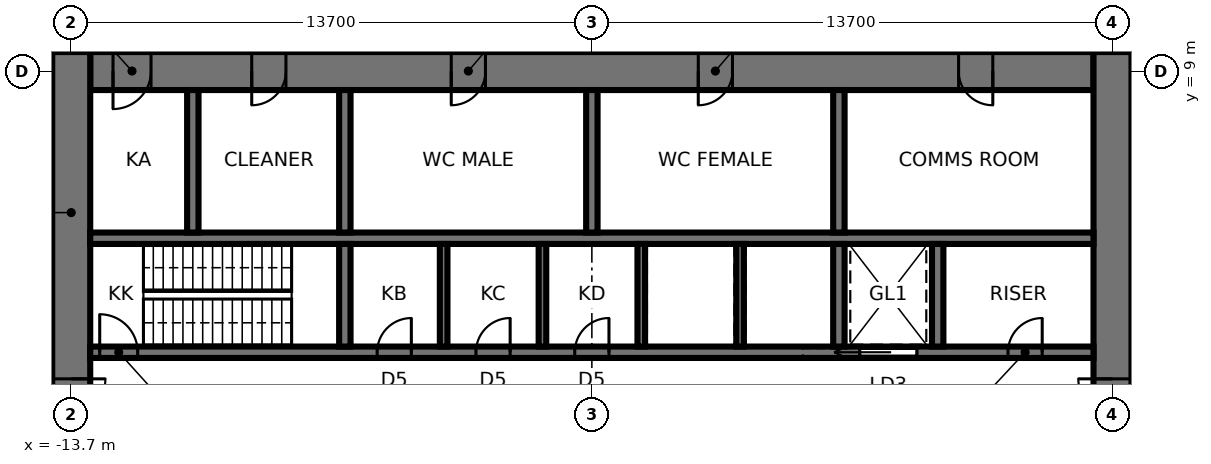
"""IFC4 building model, lengths in metres.
Left out: names, types, materials, properties, quantities, classifications, styles, units other than length and angle.
Written with IfcOpenShell. Run it as: python <this file> out.ifc"""

import sys

from ifc_helpers import new_model, si_unit, direction, frame, frame_2d, origin, place, context, subcontext, project, spatial, rectangle, extrude, element, fill, save


model = new_model("IFC4")
c1 = context("Model", 3, precision=1e-05, world=origin(), true_north=direction((0.0, 1.0)))
c2 = subcontext(c1, "Body", "Model", "MODEL_VIEW")
j1 = project(units=[si_unit("LENGTHUNIT", "METRE"), si_unit("PLANEANGLEUNIT", "RADIAN")], contexts=[c1])
p1 = place(None, origin())
s1 = spatial("IfcSite", under=j1, at=p1, CompositionType="ELEMENT")
p2 = place(p1, origin())
s2 = spatial("IfcBuilding", under=s1, at=p2, CompositionType="ELEMENT")
p3 = place(p2, frame((0.0, 0.0, 246.2)))
s3 = spatial("IfcBuildingStorey", under=s2, at=p3, CompositionType="ELEMENT", Elevation=246.2)
p4 = place(p3, frame((13.2, 9.0, 0.0), z_axis=(0.0, 0.0, 1.0), x_axis=(-1.0, 0.0, 0.0)))
e1 = element("IfcWall", 1, at=p4, inside=s3, PredefinedType="SHEAR", context=c2, shape_type="SweptSolid", body=[
    extrude(rectangle(XDim=26.4, YDim=1.0, at=frame_2d((13.2, 0.0))), origin(), (0.0, 0.0, 1.0), 5.6),
])
p5 = place(p4, frame((2.65, 0.0, 0.0)))
e2 = element("IfcOpeningElement", 2, at=p5, cuts=e1, PredefinedType="OPENING", context=c2, shape_type="SweptSolid", body=[
    extrude(rectangle(XDim=0.9, YDim=2.1, at=frame_2d((0.45, 1.05))), frame((0.0, 0.51, 0.0), z_axis=(0.0, -1.0, 0.0), x_axis=(1.0, 0.0, 0.0)), (0.0, 0.0, 1.0), 1.02),
])
p6 = place(p4, frame((9.5, 0.0, 0.0)))
e3 = element("IfcOpeningElement", 3, at=p6, cuts=e1, PredefinedType="OPENING", context=c2, shape_type="SweptSolid", body=[
    extrude(rectangle(XDim=0.9, YDim=2.1, at=frame_2d((0.45, 1.05))), frame((0.0, 0.51, 0.0), z_axis=(0.0, -1.0, 0.0), x_axis=(1.0, 0.0, 0.0)), (0.0, 0.0, 1.0), 1.02),
])
p7 = place(p4, frame((16.0, 0.0, 0.0)))
e4 = element("IfcOpeningElement", 4, at=p7, cuts=e1, PredefinedType="OPENING", context=c2, shape_type="SweptSolid", body=[
    extrude(rectangle(XDim=0.9, YDim=2.1, at=frame_2d((0.45, 1.05))), frame((0.0, 0.51, 0.0), z_axis=(0.0, -1.0, 0.0), x_axis=(1.0, 0.0, 0.0)), (0.0, 0.0, 1.0), 1.02),
])
p8 = place(p4, frame((21.25, 0.0, 0.0)))
e5 = element("IfcOpeningElement", 5, at=p8, cuts=e1, PredefinedType="OPENING", context=c2, shape_type="SweptSolid", body=[
    extrude(rectangle(XDim=0.9, YDim=2.1, at=frame_2d((0.45, 1.05))), frame((0.0, 0.51, 0.0), z_axis=(0.0, -1.0, 0.0), x_axis=(1.0, 0.0, 0.0)), (0.0, 0.0, 1.0), 1.02),
])
p9 = place(p4, frame((24.8, 0.0, 0.0)))
e6 = element("IfcOpeningElement", 6, at=p9, cuts=e1, PredefinedType="OPENING", context=c2, shape_type="SweptSolid", body=[
    extrude(rectangle(XDim=1.0, YDim=2.1, at=frame_2d((0.5, 1.05))), frame((0.0, 0.51, 0.0), z_axis=(0.0, -1.0, 0.0), x_axis=(1.0, 0.0, 0.0)), (0.0, 0.0, 1.0), 1.02),
])
p10 = place(p3, frame((13.7, -9.5, 0.0), z_axis=(0.0, 0.0, 1.0), x_axis=(0.0, 1.0, 0.0)))
e7 = element("IfcWall", 7, at=p10, inside=s3, PredefinedType="SHEAR", context=c2, shape_type="SweptSolid", body=[
    extrude(rectangle(XDim=19.0, YDim=1.0, at=frame_2d((9.5, 0.0))), origin(), (0.0, 0.0, 1.0), 5.6),
])
p11 = place(p10, frame((8.6, 0.0, 0.0)))
e8 = element("IfcOpeningElement", 8, at=p11, cuts=e7, PredefinedType="OPENING", context=c2, shape_type="SweptSolid", body=[
    extrude(rectangle(XDim=1.8, YDim=2.4, at=frame_2d((0.9, 1.2))), frame((0.0, 0.51, 0.0), z_axis=(0.0, -1.0, 0.0), x_axis=(1.0, 0.0, 0.0)), (0.0, 0.0, 1.0), 1.02),
])
p12 = place(p3, frame((-13.7, 9.5, 0.0), z_axis=(0.0, 0.0, 1.0), x_axis=(0.0, -1.0, 0.0)))
e9 = element("IfcWall", 9, at=p12, inside=s3, PredefinedType="SHEAR", context=c2, shape_type="SweptSolid", body=[
    extrude(rectangle(XDim=19.0, YDim=1.0, at=frame_2d((9.5, 0.0))), origin(), (0.0, 0.0, 1.0), 5.6),
])
p13 = place(p12, frame((8.6, 0.0, 0.0)))
e10 = element("IfcOpeningElement", 10, at=p13, cuts=e9, PredefinedType="OPENING", context=c2, shape_type="SweptSolid", body=[
    extrude(rectangle(XDim=1.8, YDim=2.4, at=frame_2d((0.9, 1.2))), frame((0.0, 0.51, 0.0), z_axis=(0.0, -1.0, 0.0), x_axis=(1.0, 0.0, 0.0)), (0.0, 0.0, 1.0), 1.02),
])
p14 = place(p3, frame((-13.2, 1.6, 0.0), z_axis=(0.0, 0.0, 1.0), x_axis=(1.0, 0.0, 0.0)))
e11 = element("IfcWall", 11, at=p14, inside=s3, PredefinedType="SHEAR", context=c2, shape_type="SweptSolid", body=[
    extrude(rectangle(XDim=26.4, YDim=0.3, at=frame_2d((13.2, 0.0))), origin(), (0.0, 0.0, 1.0), 5.6),
])
p15 = place(p14, frame((0.25, 0.0, 0.0)))
e12 = element("IfcOpeningElement", 12, at=p15, cuts=e11, PredefinedType="OPENING", context=c2, shape_type="SweptSolid", body=[
    extrude(rectangle(XDim=1.0, YDim=2.1, at=frame_2d((0.5, 1.05))), frame((0.0, 0.16, 0.0), z_axis=(0.0, -1.0, 0.0), x_axis=(1.0, 0.0, 0.0)), (0.0, 0.0, 1.0), 0.32),
])
p16 = place(p14, frame((20.25, 0.0, 0.0)))
e13 = element("IfcOpeningElement", 13, at=p16, cuts=e11, PredefinedType="OPENING", context=c2, shape_type="SweptSolid", body=[
    extrude(rectangle(XDim=1.5, YDim=2.4, at=frame_2d((0.75, 1.2))), frame((0.0, 0.16, 0.0), z_axis=(0.0, -1.0, 0.0), x_axis=(1.0, 0.0, 0.0)), (0.0, 0.0, 1.0), 0.32),
])
p17 = place(p14, frame((7.55, 0.0, 0.0)))
e14 = element("IfcOpeningElement", 14, at=p17, cuts=e11, PredefinedType="OPENING", context=c2, shape_type="SweptSolid", body=[
    extrude(rectangle(XDim=0.9, YDim=2.1, at=frame_2d((0.45, 1.05))), frame((0.0, 0.16, 0.0), z_axis=(0.0, -1.0, 0.0), x_axis=(1.0, 0.0, 0.0)), (0.0, 0.0, 1.0), 0.32),
])
p18 = place(p14, frame((10.15, 0.0, 0.0)))
e15 = element("IfcOpeningElement", 15, at=p18, cuts=e11, PredefinedType="OPENING", context=c2, shape_type="SweptSolid", body=[
    extrude(rectangle(XDim=0.9, YDim=2.1, at=frame_2d((0.45, 1.05))), frame((0.0, 0.16, 0.0), z_axis=(0.0, -1.0, 0.0), x_axis=(1.0, 0.0, 0.0)), (0.0, 0.0, 1.0), 0.32),
])
p19 = place(p14, frame((12.75, 0.0, 0.0)))
e16 = element("IfcOpeningElement", 16, at=p19, cuts=e11, PredefinedType="OPENING", context=c2, shape_type="SweptSolid", body=[
    extrude(rectangle(XDim=0.9, YDim=2.1, at=frame_2d((0.45, 1.05))), frame((0.0, 0.16, 0.0), z_axis=(0.0, -1.0, 0.0), x_axis=(1.0, 0.0, 0.0)), (0.0, 0.0, 1.0), 0.32),
])
p20 = place(p14, frame((24.15, 0.0, 0.0)))
e17 = element("IfcOpeningElement", 17, at=p20, cuts=e11, PredefinedType="OPENING", context=c2, shape_type="SweptSolid", body=[
    extrude(rectangle(XDim=0.9, YDim=2.1, at=frame_2d((0.45, 1.05))), frame((0.0, 0.16, 0.0), z_axis=(0.0, -1.0, 0.0), x_axis=(1.0, 0.0, 0.0)), (0.0, 0.0, 1.0), 0.32),
])
p21 = place(p3, frame((-13.2, 4.6, 0.0), z_axis=(0.0, 0.0, 1.0), x_axis=(1.0, 0.0, 0.0)))
e18 = element("IfcWall", 18, at=p21, inside=s3, PredefinedType="SHEAR", context=c2, shape_type="SweptSolid", body=[
    extrude(rectangle(XDim=26.4, YDim=0.3, at=frame_2d((13.2, 0.0))), origin(), (0.0, 0.0, 1.0), 5.6),
])
p22 = place(p3, frame((-6.5, 1.75, 0.0), z_axis=(0.0, 0.0, 1.0), x_axis=(0.0, 1.0, 0.0)))
e19 = element("IfcWall", 19, at=p22, inside=s3, PredefinedType="SHEAR", context=c2, shape_type="SweptSolid", body=[
    extrude(rectangle(XDim=2.7, YDim=0.3, at=frame_2d((1.35, 0.0))), origin(), (0.0, 0.0, 1.0), 5.6),
])
p23 = place(p3, frame((-6.5, 4.75, 0.0), z_axis=(0.0, 0.0, 1.0), x_axis=(0.0, 1.0, 0.0)))
e20 = element("IfcWall", 20, at=p23, inside=s3, PredefinedType="SHEAR", context=c2, shape_type="SweptSolid", body=[
    extrude(rectangle(XDim=3.75, YDim=0.3, at=frame_2d((1.875, 0.0))), origin(), (0.0, 0.0, 1.0), 5.6),
])
p24 = place(p3, frame((6.5, 1.75, 0.0), z_axis=(0.0, 0.0, 1.0), x_axis=(0.0, 1.0, 0.0)))
e21 = element("IfcWall", 21, at=p24, inside=s3, PredefinedType="SHEAR", context=c2, shape_type="SweptSolid", body=[
    extrude(rectangle(XDim=2.7, YDim=0.3, at=frame_2d((1.35, 0.0))), origin(), (0.0, 0.0, 1.0), 5.6),
])
p25 = place(p3, frame((6.5, 4.75, 0.0), z_axis=(0.0, 0.0, 1.0), x_axis=(0.0, 1.0, 0.0)))
e22 = element("IfcWall", 22, at=p25, inside=s3, PredefinedType="SHEAR", context=c2, shape_type="SweptSolid", body=[
    extrude(rectangle(XDim=3.75, YDim=0.3, at=frame_2d((1.875, 0.0))), origin(), (0.0, 0.0, 1.0), 5.6),
])
for number, where, z_axis, x_axis in (
    (23, (-3.9, 1.75, 0.0), (0.0, 0.0, 1.0), (0.0, 1.0, 0.0)),
    (24, (-1.3, 1.75, 0.0), (0.0, 0.0, 1.0), (0.0, 1.0, 0.0)),
    (25, (1.3, 1.75, 0.0), (0.0, 0.0, 1.0), (0.0, 1.0, 0.0)),
    (26, (3.9, 1.75, 0.0), (0.0, 0.0, 1.0), (0.0, 1.0, 0.0)),
):
    element("IfcWall", number, at=place(p3, frame(where, z_axis=z_axis, x_axis=x_axis)), inside=s3, PredefinedType="SHEAR", context=c2, shape_type="SweptSolid", body=[
        extrude(rectangle(XDim=2.7, YDim=0.2, at=frame_2d((1.35, 0.0))), origin(), (0.0, 0.0, 1.0), 5.6),
    ])
for number, where, z_axis, x_axis in (
    (27, (0.0, 4.75, 0.0), (0.0, 0.0, 1.0), (0.0, 1.0, 0.0)),
    (28, (-10.5, 4.75, 0.0), (0.0, 0.0, 1.0), (0.0, 1.0, 0.0)),
):
    element("IfcWall", number, at=place(p3, frame(where, z_axis=z_axis, x_axis=x_axis)), inside=s3, PredefinedType="SHEAR", context=c2, shape_type="SweptSolid", body=[
        extrude(rectangle(XDim=3.75, YDim=0.3, at=frame_2d((1.875, 0.0))), origin(), (0.0, 0.0, 1.0), 5.6),
    ])
p26 = place(p3, frame((9.1, 1.75, 0.0), z_axis=(0.0, 0.0, 1.0), x_axis=(0.0, 1.0, 0.0)))
e29 = element("IfcWall", 29, at=p26, inside=s3, PredefinedType="SHEAR", context=c2, shape_type="SweptSolid", body=[
    extrude(rectangle(XDim=2.7, YDim=0.3, at=frame_2d((1.35, 0.0))), origin(), (0.0, 0.0, 1.0), 5.6),
])
p27 = place(p13, origin())
e30 = element("IfcDoor", 30, at=p27, inside=s3, OperationType="DOUBLE_DOOR_SINGLE_SWING", PredefinedType="DOOR", context=c2, shape_type="SweptSolid", body=[
    extrude(rectangle(XDim=1.72, YDim=2.36, at=frame_2d((0.9, 1.18))), frame((0.0, 0.025, 0.0), z_axis=(0.0, -1.0, 0.0), x_axis=(1.0, 0.0, 0.0)), (0.0, 0.0, 1.0), 0.05),
    extrude(rectangle(XDim=0.04, YDim=2.4, at=frame_2d((0.02, 1.2))), frame((0.0, 0.25, 0.0), z_axis=(0.0, -1.0, 0.0), x_axis=(1.0, 0.0, 0.0)), (0.0, 0.0, 1.0), 0.5),
    extrude(rectangle(XDim=0.04, YDim=2.4, at=frame_2d((1.78, 1.2))), frame((0.0, 0.25, 0.0), z_axis=(0.0, -1.0, 0.0), x_axis=(1.0, 0.0, 0.0)), (0.0, 0.0, 1.0), 0.5),
    extrude(rectangle(XDim=1.72, YDim=0.04, at=frame_2d((0.9, 2.38))), frame((0.0, 0.25, 0.0), z_axis=(0.0, -1.0, 0.0), x_axis=(1.0, 0.0, 0.0)), (0.0, 0.0, 1.0), 0.5),
])
fill(e10, e30)
p28 = place(p11, origin())
e31 = element("IfcDoor", 31, at=p28, inside=s3, OperationType="DOUBLE_DOOR_SINGLE_SWING", PredefinedType="DOOR", context=c2, shape_type="SweptSolid", body=[
    extrude(rectangle(XDim=1.72, YDim=2.36, at=frame_2d((0.9, 1.18))), frame((0.0, 0.025, 0.0), z_axis=(0.0, -1.0, 0.0), x_axis=(1.0, 0.0, 0.0)), (0.0, 0.0, 1.0), 0.05),
    extrude(rectangle(XDim=0.04, YDim=2.4, at=frame_2d((0.02, 1.2))), frame((0.0, 0.25, 0.0), z_axis=(0.0, -1.0, 0.0), x_axis=(1.0, 0.0, 0.0)), (0.0, 0.0, 1.0), 0.5),
    extrude(rectangle(XDim=0.04, YDim=2.4, at=frame_2d((1.78, 1.2))), frame((0.0, 0.25, 0.0), z_axis=(0.0, -1.0, 0.0), x_axis=(1.0, 0.0, 0.0)), (0.0, 0.0, 1.0), 0.5),
    extrude(rectangle(XDim=1.72, YDim=0.04, at=frame_2d((0.9, 2.38))), frame((0.0, 0.25, 0.0), z_axis=(0.0, -1.0, 0.0), x_axis=(1.0, 0.0, 0.0)), (0.0, 0.0, 1.0), 0.5),
])
fill(e8, e31)
p29 = place(p15, origin())
e32 = element("IfcDoor", 32, at=p29, inside=s3, OperationType="SINGLE_SWING_LEFT", PredefinedType="DOOR", context=c2, shape_type="SweptSolid", body=[
    extrude(rectangle(XDim=1.0, YDim=2.1, at=frame_2d((0.5, 1.05))), frame((0.0, 0.025, 0.0), z_axis=(0.0, -1.0, 0.0), x_axis=(1.0, 0.0, 0.0)), (0.0, 0.0, 1.0), 0.05),
])
fill(e12, e32)
p30 = place(p16, origin())
e33 = element("IfcDoor", 33, at=p30, inside=s3, OperationType="SLIDING_TO_LEFT", PredefinedType="DOOR", context=c2, shape_type="SweptSolid", body=[
    extrude(rectangle(XDim=1.5, YDim=2.4, at=frame_2d((0.75, 1.2))), frame((0.0, 0.025, 0.0), z_axis=(0.0, -1.0, 0.0), x_axis=(1.0, 0.0, 0.0)), (0.0, 0.0, 1.0), 0.05),
])
fill(e13, e33)
p31 = place(p17, origin())
e34 = element("IfcDoor", 34, at=p31, inside=s3, OperationType="SINGLE_SWING_RIGHT", PredefinedType="DOOR", context=c2, shape_type="SweptSolid", body=[
    extrude(rectangle(XDim=0.9, YDim=2.1, at=frame_2d((0.45, 1.05))), frame((0.0, 0.025, 0.0), z_axis=(0.0, -1.0, 0.0), x_axis=(1.0, 0.0, 0.0)), (0.0, 0.0, 1.0), 0.05),
])
fill(e14, e34)
p32 = place(p18, origin())
e35 = element("IfcDoor", 35, at=p32, inside=s3, OperationType="SINGLE_SWING_RIGHT", PredefinedType="DOOR", context=c2, shape_type="SweptSolid", body=[
    extrude(rectangle(XDim=0.9, YDim=2.1, at=frame_2d((0.45, 1.05))), frame((0.0, 0.025, 0.0), z_axis=(0.0, -1.0, 0.0), x_axis=(1.0, 0.0, 0.0)), (0.0, 0.0, 1.0), 0.05),
])
fill(e15, e35)
p33 = place(p19, origin())
e36 = element("IfcDoor", 36, at=p33, inside=s3, OperationType="SINGLE_SWING_RIGHT", PredefinedType="DOOR", context=c2, shape_type="SweptSolid", body=[
    extrude(rectangle(XDim=0.9, YDim=2.1, at=frame_2d((0.45, 1.05))), frame((0.0, 0.025, 0.0), z_axis=(0.0, -1.0, 0.0), x_axis=(1.0, 0.0, 0.0)), (0.0, 0.0, 1.0), 0.05),
])
fill(e16, e36)
p34 = place(p20, origin())
e37 = element("IfcDoor", 37, at=p34, inside=s3, OperationType="SINGLE_SWING_RIGHT", PredefinedType="DOOR", context=c2, shape_type="SweptSolid", body=[
    extrude(rectangle(XDim=0.9, YDim=2.1, at=frame_2d((0.45, 1.05))), frame((0.0, 0.025, 0.0), z_axis=(0.0, -1.0, 0.0), x_axis=(1.0, 0.0, 0.0)), (0.0, 0.0, 1.0), 0.05),
])
fill(e17, e37)
p35 = place(p5, origin())
e38 = element("IfcDoor", 38, at=p35, inside=s3, OperationType="SINGLE_SWING_LEFT", PredefinedType="DOOR", context=c2, shape_type="SweptSolid", body=[
    extrude(rectangle(XDim=0.82, YDim=2.06, at=frame_2d((0.45, 1.03))), frame((0.0, 0.025, 0.0), z_axis=(0.0, -1.0, 0.0), x_axis=(1.0, 0.0, 0.0)), (0.0, 0.0, 1.0), 0.05),
    extrude(rectangle(XDim=0.04, YDim=2.1, at=frame_2d((0.02, 1.05))), frame((0.0, 0.25, 0.0), z_axis=(0.0, -1.0, 0.0), x_axis=(1.0, 0.0, 0.0)), (0.0, 0.0, 1.0), 0.5),
    extrude(rectangle(XDim=0.04, YDim=2.1, at=frame_2d((0.88, 1.05))), frame((0.0, 0.25, 0.0), z_axis=(0.0, -1.0, 0.0), x_axis=(1.0, 0.0, 0.0)), (0.0, 0.0, 1.0), 0.5),
    extrude(rectangle(XDim=0.82, YDim=0.04, at=frame_2d((0.45, 2.08))), frame((0.0, 0.25, 0.0), z_axis=(0.0, -1.0, 0.0), x_axis=(1.0, 0.0, 0.0)), (0.0, 0.0, 1.0), 0.5),
])
fill(e2, e38)
p36 = place(p6, origin())
e39 = element("IfcDoor", 39, at=p36, inside=s3, OperationType="SINGLE_SWING_RIGHT", PredefinedType="DOOR", context=c2, shape_type="SweptSolid", body=[
    extrude(rectangle(XDim=0.82, YDim=2.06, at=frame_2d((0.45, 1.03))), frame((0.0, 0.025, 0.0), z_axis=(0.0, -1.0, 0.0), x_axis=(1.0, 0.0, 0.0)), (0.0, 0.0, 1.0), 0.05),
    extrude(rectangle(XDim=0.04, YDim=2.1, at=frame_2d((0.02, 1.05))), frame((0.0, 0.25, 0.0), z_axis=(0.0, -1.0, 0.0), x_axis=(1.0, 0.0, 0.0)), (0.0, 0.0, 1.0), 0.5),
    extrude(rectangle(XDim=0.04, YDim=2.1, at=frame_2d((0.88, 1.05))), frame((0.0, 0.25, 0.0), z_axis=(0.0, -1.0, 0.0), x_axis=(1.0, 0.0, 0.0)), (0.0, 0.0, 1.0), 0.5),
    extrude(rectangle(XDim=0.82, YDim=0.04, at=frame_2d((0.45, 2.08))), frame((0.0, 0.25, 0.0), z_axis=(0.0, -1.0, 0.0), x_axis=(1.0, 0.0, 0.0)), (0.0, 0.0, 1.0), 0.5),
])
fill(e3, e39)
p37 = place(p7, origin())
e40 = element("IfcDoor", 40, at=p37, inside=s3, OperationType="SINGLE_SWING_RIGHT", PredefinedType="DOOR", context=c2, shape_type="SweptSolid", body=[
    extrude(rectangle(XDim=0.82, YDim=2.06, at=frame_2d((0.45, 1.03))), frame((0.0, 0.025, 0.0), z_axis=(0.0, -1.0, 0.0), x_axis=(1.0, 0.0, 0.0)), (0.0, 0.0, 1.0), 0.05),
    extrude(rectangle(XDim=0.04, YDim=2.1, at=frame_2d((0.02, 1.05))), frame((0.0, 0.25, 0.0), z_axis=(0.0, -1.0, 0.0), x_axis=(1.0, 0.0, 0.0)), (0.0, 0.0, 1.0), 0.5),
    extrude(rectangle(XDim=0.04, YDim=2.1, at=frame_2d((0.88, 1.05))), frame((0.0, 0.25, 0.0), z_axis=(0.0, -1.0, 0.0), x_axis=(1.0, 0.0, 0.0)), (0.0, 0.0, 1.0), 0.5),
    extrude(rectangle(XDim=0.82, YDim=0.04, at=frame_2d((0.45, 2.08))), frame((0.0, 0.25, 0.0), z_axis=(0.0, -1.0, 0.0), x_axis=(1.0, 0.0, 0.0)), (0.0, 0.0, 1.0), 0.5),
])
fill(e4, e40)
p38 = place(p8, origin())
e41 = element("IfcDoor", 41, at=p38, inside=s3, OperationType="SINGLE_SWING_RIGHT", PredefinedType="DOOR", context=c2, shape_type="SweptSolid", body=[
    extrude(rectangle(XDim=0.82, YDim=2.06, at=frame_2d((0.45, 1.03))), frame((0.0, 0.025, 0.0), z_axis=(0.0, -1.0, 0.0), x_axis=(1.0, 0.0, 0.0)), (0.0, 0.0, 1.0), 0.05),
    extrude(rectangle(XDim=0.04, YDim=2.1, at=frame_2d((0.02, 1.05))), frame((0.0, 0.25, 0.0), z_axis=(0.0, -1.0, 0.0), x_axis=(1.0, 0.0, 0.0)), (0.0, 0.0, 1.0), 0.5),
    extrude(rectangle(XDim=0.04, YDim=2.1, at=frame_2d((0.88, 1.05))), frame((0.0, 0.25, 0.0), z_axis=(0.0, -1.0, 0.0), x_axis=(1.0, 0.0, 0.0)), (0.0, 0.0, 1.0), 0.5),
    extrude(rectangle(XDim=0.82, YDim=0.04, at=frame_2d((0.45, 2.08))), frame((0.0, 0.25, 0.0), z_axis=(0.0, -1.0, 0.0), x_axis=(1.0, 0.0, 0.0)), (0.0, 0.0, 1.0), 0.5),
])
fill(e5, e41)
p39 = place(p9, origin())
e42 = element("IfcDoor", 42, at=p39, inside=s3, OperationType="SINGLE_SWING_RIGHT", PredefinedType="DOOR", context=c2, shape_type="SweptSolid", body=[
    extrude(rectangle(XDim=0.92, YDim=2.06, at=frame_2d((0.5, 1.03))), frame((0.0, 0.025, 0.0), z_axis=(0.0, -1.0, 0.0), x_axis=(1.0, 0.0, 0.0)), (0.0, 0.0, 1.0), 0.05),
    extrude(rectangle(XDim=0.04, YDim=2.1, at=frame_2d((0.02, 1.05))), frame((0.0, 0.25, 0.0), z_axis=(0.0, -1.0, 0.0), x_axis=(1.0, 0.0, 0.0)), (0.0, 0.0, 1.0), 0.5),
    extrude(rectangle(XDim=0.04, YDim=2.1, at=frame_2d((0.98, 1.05))), frame((0.0, 0.25, 0.0), z_axis=(0.0, -1.0, 0.0), x_axis=(1.0, 0.0, 0.0)), (0.0, 0.0, 1.0), 0.5),
    extrude(rectangle(XDim=0.92, YDim=0.04, at=frame_2d((0.5, 2.08))), frame((0.0, 0.25, 0.0), z_axis=(0.0, -1.0, 0.0), x_axis=(1.0, 0.0, 0.0)), (0.0, 0.0, 1.0), 0.5),
])
fill(e6, e42)
save(model, sys.argv[1])
